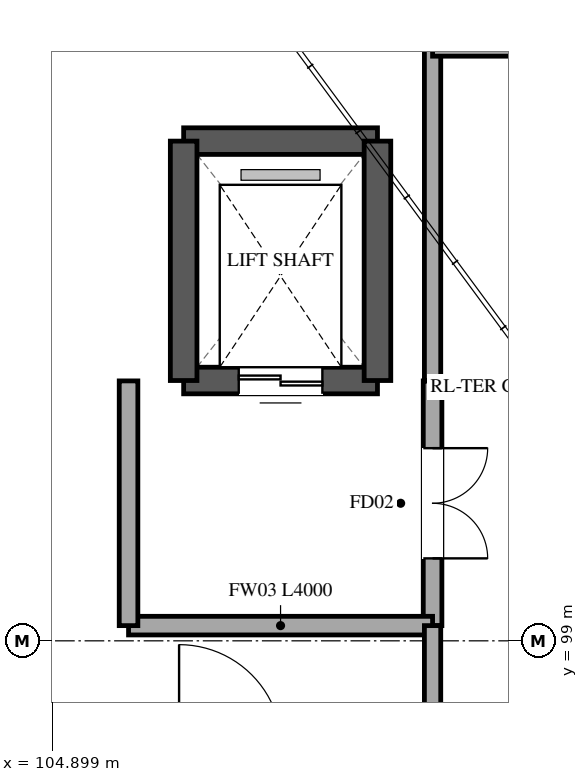
"""IFC4 building model, lengths in metres.
Left out: names, types, materials, properties, quantities, classifications, styles, units other than length and angle.
Written with IfcOpenShell. Run it as: python <this file> out.ifc"""

import sys

from ifc_helpers import new_model, si_unit, direction, frame, frame_2d, origin, place, context, subcontext, project, spatial, rectangle, extrude, element, fill, save


model = new_model("IFC4")
c1 = context("Model", 3, precision=1e-05, world=origin(), true_north=direction((0.0, 1.0)))
c2 = subcontext(c1, "Body", "Model", "MODEL_VIEW")
j1 = project(units=[si_unit("LENGTHUNIT", "METRE"), si_unit("PLANEANGLEUNIT", "RADIAN")], contexts=[c1])
p1 = place(None, origin())
s1 = spatial("IfcSite", under=j1, at=p1, CompositionType="ELEMENT")
p2 = place(p1, origin())
s2 = spatial("IfcBuilding", under=s1, at=p2, CompositionType="ELEMENT")
p3 = place(p2, frame((0.0, 0.0, 21.6)))
s3 = spatial("IfcBuildingStorey", under=s2, at=p3, CompositionType="ELEMENT", Elevation=21.6)
p4 = place(p3, frame((106.625, 105.575, 0.0), z_axis=(0.0, 0.0, 1.0), x_axis=(1.0, 0.0, 0.0)))
e1 = element("IfcWall", 1, at=p4, inside=s3, PredefinedType="SHEAR", context=c2, shape_type="SweptSolid", body=[
    extrude(rectangle(XDim=2.55, YDim=0.35, at=frame_2d((1.275, 0.0))), origin(), (0.0, 0.0, 1.0), 5.1),
])
p5 = place(p3, frame((109.175, 102.425, 0.0), z_axis=(0.0, 0.0, 1.0), x_axis=(-1.0, 0.0, 0.0)))
e2 = element("IfcWall", 2, at=p5, inside=s3, PredefinedType="SHEAR", context=c2, shape_type="SweptSolid", body=[
    extrude(rectangle(XDim=2.55, YDim=0.35, at=frame_2d((1.275, 0.0))), origin(), (0.0, 0.0, 1.0), 5.1),
])
p6 = place(p5, frame((0.725, 0.0, 0.0)))
e3 = element("IfcOpeningElement", 3, at=p6, cuts=e2, PredefinedType="OPENING", context=c2, shape_type="SweptSolid", body=[
    extrude(rectangle(XDim=1.1, YDim=2.2, at=frame_2d((0.55, 1.1))), frame((0.0, 0.185, 0.0), z_axis=(0.0, -1.0, 0.0), x_axis=(1.0, 0.0, 0.0)), (0.0, 0.0, 1.0), 0.37),
])
for number, where, z_axis, x_axis in (
    (4, (106.625, 102.425, 0.0), (0.0, 0.0, 1.0), (0.0, 1.0, 0.0)),
    (5, (109.175, 105.575, 0.0), (0.0, 0.0, 1.0), (0.0, -1.0, 0.0)),
):
    element("IfcWall", number, at=place(p3, frame(where, z_axis=z_axis, x_axis=x_axis)), inside=s3, PredefinedType="SHEAR", context=c2, shape_type="SweptSolid", body=[
        extrude(rectangle(XDim=3.15, YDim=0.35, at=frame_2d((1.575, 0.0))), origin(), (0.0, 0.0, 1.0), 5.1),
    ])
p7 = place(p3, frame((109.9, 102.42, 0.0), z_axis=(0.0, 0.0, 1.0), x_axis=(0.0, -1.0, 0.0)))
e6 = element("IfcWall", 6, at=p7, inside=s3, PredefinedType="STANDARD", context=c2, shape_type="SweptSolid", body=[
    extrude(rectangle(XDim=3.22, YDim=0.245, at=frame_2d((1.61, 0.0))), origin(), (0.0, 0.0, 1.0), 4.075),
])
p8 = place(p7, frame((0.885, 0.0, 0.0)))
e7 = element("IfcOpeningElement", 7, at=p8, cuts=e6, PredefinedType="OPENING", context=c2, shape_type="SweptSolid", body=[
    extrude(rectangle(XDim=1.45, YDim=2.2, at=frame_2d((0.725, 1.1))), frame((0.0, 0.133, 0.0), z_axis=(0.0, -1.0, 0.0), x_axis=(1.0, 0.0, 0.0)), (0.0, 0.0, 1.0), 0.265),
])
p9 = place(p3, frame((109.9, 99.2, 0.0), z_axis=(0.0, 0.0, 1.0), x_axis=(-1.0, 0.0, 0.0)))
e8 = element("IfcWall", 8, at=p9, inside=s3, PredefinedType="STANDARD", context=c2, shape_type="SweptSolid", body=[
    extrude(rectangle(XDim=4.0, YDim=0.245, at=frame_2d((2.0, 0.0))), origin(), (0.0, 0.0, 1.0), 4.075),
])
p10 = place(p3, frame((105.9, 99.2, 0.0), z_axis=(0.0, 0.0, 1.0), x_axis=(0.0, 1.0, 0.0)))
e9 = element("IfcWall", 9, at=p10, inside=s3, PredefinedType="STANDARD", context=c2, shape_type="SweptSolid", body=[
    extrude(rectangle(XDim=3.22, YDim=0.245, at=frame_2d((1.61, 0.0))), origin(), (0.0, 0.0, 1.0), 4.075),
])
p11 = place(p3, frame((109.9, 97.6, 0.0), z_axis=(0.0, 0.0, 1.0), x_axis=(0.0, 1.0, 0.0)))
e10 = element("IfcWall", 10, at=p11, inside=s3, PredefinedType="PARTITIONING", context=c2, shape_type="SweptSolid", body=[
    extrude(rectangle(XDim=1.6, YDim=0.215, at=frame_2d((0.8, 0.0))), origin(), (0.0, 0.0, 1.0), 4.075),
])
p12 = place(p3, frame((109.9, 102.42, 0.0), z_axis=(0.0, 0.0, 1.0), x_axis=(0.0, 1.0, 0.0)))
e11 = element("IfcWall", 11, at=p12, inside=s3, PredefinedType="PARTITIONING", context=c2, shape_type="SweptSolid", body=[
    extrude(rectangle(XDim=4.38, YDim=0.215, at=frame_2d((2.19, 0.0))), origin(), (0.0, 0.0, 1.0), 4.275),
])
p13 = place(p3, frame((109.9, 106.8, 0.0), z_axis=(0.0, 0.0, 1.0), x_axis=(1.0, 0.0, 0.0)))
e12 = element("IfcWall", 12, at=p13, inside=s3, PredefinedType="PARTITIONING", context=c2, shape_type="SweptSolid", body=[
    extrude(rectangle(XDim=2.79, YDim=0.215, at=frame_2d((1.395, 0.0))), origin(), (0.0, 0.0, 1.0), 4.275),
])
p14 = place(p6, origin())
e13 = element("IfcDoor", 13, at=p14, inside=s3, OperationType="DOUBLE_DOOR_SLIDING", PredefinedType="DOOR", context=c2, shape_type="SweptSolid", body=[
    extrude(rectangle(XDim=1.1, YDim=2.2, at=frame_2d((0.55, 1.1))), frame((0.0, 0.025, 0.0), z_axis=(0.0, -1.0, 0.0), x_axis=(1.0, 0.0, 0.0)), (0.0, 0.0, 1.0), 0.05),
])
fill(e3, e13)
p15 = place(p8, origin())
e14 = element("IfcDoor", 14, at=p15, inside=s3, OperationType="DOUBLE_DOOR_SINGLE_SWING", PredefinedType="DOOR", context=c2, shape_type="SweptSolid", body=[
    extrude(rectangle(XDim=1.45, YDim=2.2, at=frame_2d((0.725, 1.1))), frame((0.0, 0.025, 0.0), z_axis=(0.0, -1.0, 0.0), x_axis=(1.0, 0.0, 0.0)), (0.0, 0.0, 1.0), 0.05),
])
fill(e7, e14)
save(model, sys.argv[1])
